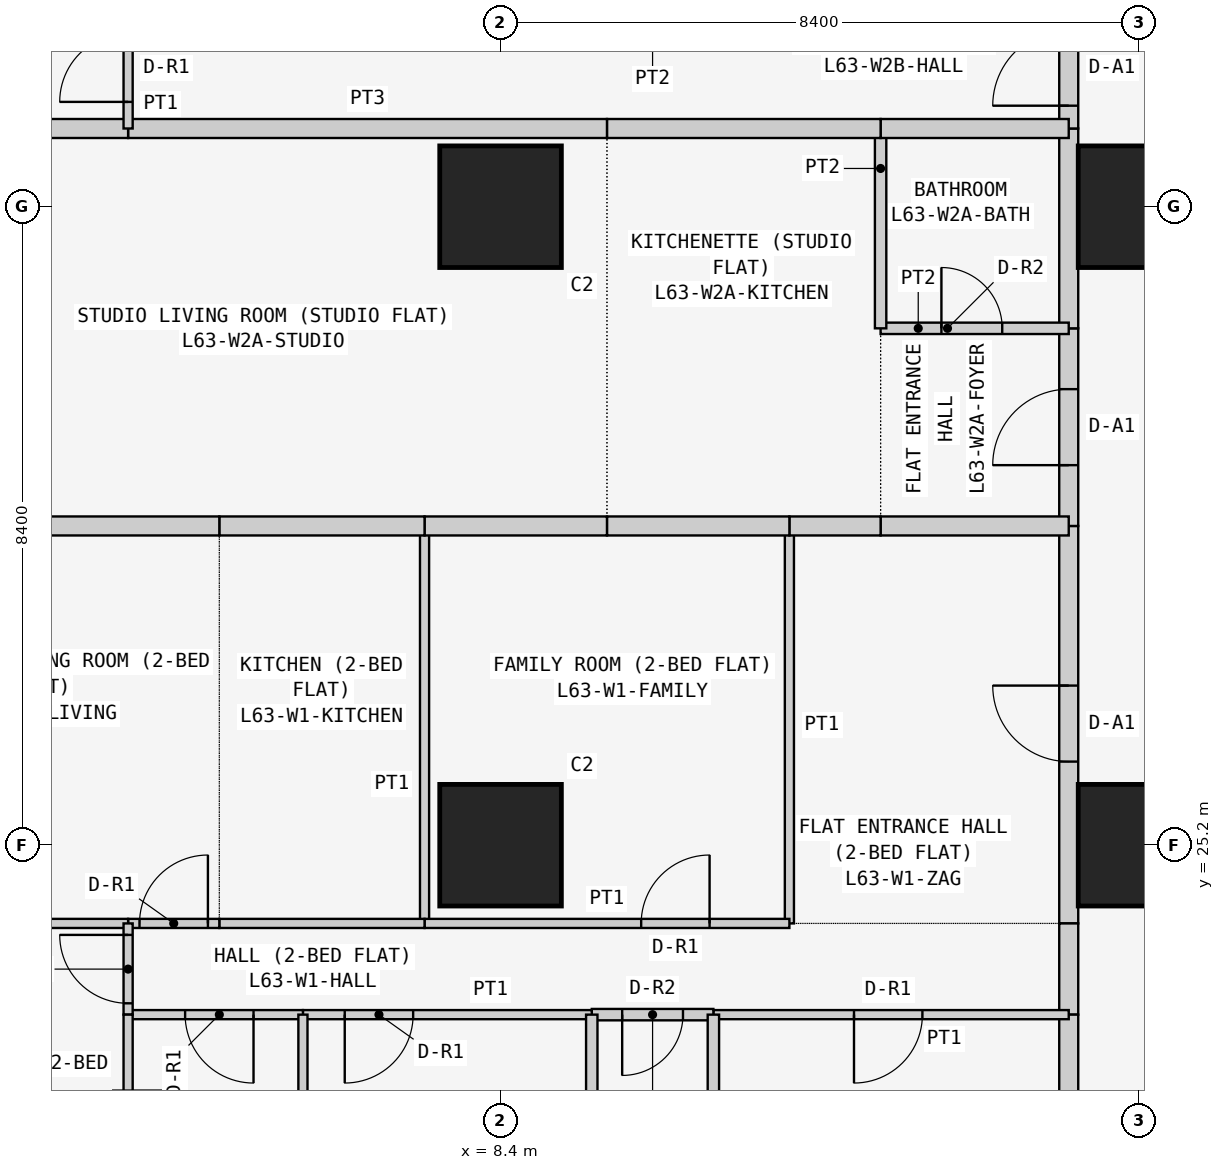
"""IFC4 building model, lengths in metres.
Left out: names, types, materials, properties, quantities, classifications, styles, units other than length and angle.
Written with IfcOpenShell. Run it as: python <this file> out.ifc"""

import sys

from ifc_helpers import new_model, si_unit, direction, frame, frame_2d, origin, origin_2d, place, context, subcontext, project, spatial, rectangle, extrude, element, fill, save


model = new_model("IFC4")
c1 = context("Model", 3, precision=1e-05, world=origin(), true_north=direction((0.0, 1.0)))
c2 = subcontext(c1, "Body", "Model", "MODEL_VIEW")
j1 = project(units=[si_unit("LENGTHUNIT", "METRE"), si_unit("PLANEANGLEUNIT", "RADIAN")], contexts=[c1])
p1 = place(None, origin())
s1 = spatial("IfcSite", under=j1, at=p1, CompositionType="ELEMENT")
p2 = place(p1, origin())
s2 = spatial("IfcBuilding", under=s1, at=p2, CompositionType="ELEMENT")
p3 = place(p2, frame((0.0, 0.0, 240.9)))
s3 = spatial("IfcBuildingStorey", under=s2, at=p3, CompositionType="ELEMENT", Elevation=240.9)
for number, where, z_axis, x_axis in (
    (1, (8.4, 25.2, 0.0), (0.0, 0.0, 1.0), (1.0, 0.0, 0.0)),
    (2, (8.4, 33.6, 0.0), (0.0, 0.0, 1.0), (1.0, 0.0, 0.0)),
    (3, (16.8, 25.2, 0.0), (0.0, 0.0, 1.0), (1.0, 0.0, 0.0)),
    (4, (16.8, 33.6, 0.0), (0.0, 0.0, 1.0), (1.0, 0.0, 0.0)),
):
    element("IfcColumn", number, at=place(p3, frame(where, z_axis=z_axis, x_axis=x_axis)), inside=s3, PredefinedType="COLUMN", context=c2, shape_type="SweptSolid", body=[
        extrude(rectangle(XDim=1.6, YDim=1.6, at=origin_2d()), origin(), (0.0, 0.0, 1.0), 3.6),
    ])
p4 = place(p3, frame((15.875, 24.171, 0.0), z_axis=(0.0, 0.0, 1.0), x_axis=(0.0, 1.0, 0.0)))
e5 = element("IfcWall", 5, at=p4, inside=s3, PredefinedType="PARTITIONING", context=c2, shape_type="SweptSolid", body=[
    extrude(rectangle(XDim=5.229, YDim=0.25, at=frame_2d((2.615, 0.0))), origin(), (0.0, 0.0, 1.0), 3.45),
])
p5 = place(p4, frame((2.129, 0.0, 0.0)))
e6 = element("IfcOpeningElement", 6, at=p5, cuts=e5, PredefinedType="OPENING", context=c2, shape_type="SweptSolid", body=[
    extrude(rectangle(XDim=1.0, YDim=2.1, at=frame_2d((0.5, 1.05))), frame((0.0, 0.135, 0.0), z_axis=(0.0, -1.0, 0.0), x_axis=(1.0, 0.0, 0.0)), (0.0, 0.0, 1.0), 0.27),
])
p6 = place(p3, frame((15.875, 22.971, 0.0), z_axis=(0.0, 0.0, 1.0), x_axis=(0.0, 1.0, 0.0)))
e7 = element("IfcWall", 7, at=p6, inside=s3, PredefinedType="PARTITIONING", context=c2, shape_type="SweptSolid", body=[
    extrude(rectangle(XDim=1.2, YDim=0.25, at=frame_2d((0.6, 0.0))), origin(), (0.0, 0.0, 1.0), 3.45),
])
p7 = place(p3, frame((15.875, 16.1, 0.0), z_axis=(0.0, 0.0, 1.0), x_axis=(0.0, 1.0, 0.0)))
e8 = element("IfcWall", 8, at=p7, inside=s3, PredefinedType="PARTITIONING", context=c2, shape_type="SweptSolid", body=[
    extrude(rectangle(XDim=6.871, YDim=0.25, at=frame_2d((3.436, 0.0))), origin(), (0.0, 0.0, 1.0), 3.45),
])
p8 = place(p3, frame((15.875, 29.4, 0.0), z_axis=(0.0, 0.0, 1.0), x_axis=(0.0, 1.0, 0.0)))
e9 = element("IfcWall", 9, at=p8, inside=s3, PredefinedType="PARTITIONING", context=c2, shape_type="SweptSolid", body=[
    extrude(rectangle(XDim=2.6, YDim=0.25, at=frame_2d((1.3, 0.0))), origin(), (0.0, 0.0, 1.0), 3.45),
])
p9 = place(p8, frame((0.8, 0.0, 0.0)))
e10 = element("IfcOpeningElement", 10, at=p9, cuts=e9, PredefinedType="OPENING", context=c2, shape_type="SweptSolid", body=[
    extrude(rectangle(XDim=1.0, YDim=2.1, at=frame_2d((0.5, 1.05))), frame((0.0, 0.135, 0.0), z_axis=(0.0, -1.0, 0.0), x_axis=(1.0, 0.0, 0.0)), (0.0, 0.0, 1.0), 0.27),
])
p10 = place(p3, frame((15.875, 32.0, 0.0), z_axis=(0.0, 0.0, 1.0), x_axis=(0.0, 1.0, 0.0)))
e11 = element("IfcWall", 11, at=p10, inside=s3, PredefinedType="PARTITIONING", context=c2, shape_type="SweptSolid", body=[
    extrude(rectangle(XDim=2.629, YDim=0.25, at=frame_2d((1.314, 0.0))), origin(), (0.0, 0.0, 1.0), 3.45),
])
p11 = place(p3, frame((15.875, 34.629, 0.0), z_axis=(0.0, 0.0, 1.0), x_axis=(0.0, 1.0, 0.0)))
e12 = element("IfcWall", 12, at=p11, inside=s3, PredefinedType="PARTITIONING", context=c2, shape_type="SweptSolid", body=[
    extrude(rectangle(XDim=1.6, YDim=0.25, at=frame_2d((0.8, 0.0))), origin(), (0.0, 0.0, 1.0), 3.45),
])
p12 = place(p11, frame((0.3, 0.0, 0.0)))
e13 = element("IfcOpeningElement", 13, at=p12, cuts=e12, PredefinedType="OPENING", context=c2, shape_type="SweptSolid", body=[
    extrude(rectangle(XDim=1.0, YDim=2.1, at=frame_2d((0.5, 1.05))), frame((0.0, 0.135, 0.0), z_axis=(0.0, -1.0, 0.0), x_axis=(1.0, 0.0, 0.0)), (0.0, 0.0, 1.0), 0.27),
])
p13 = place(p3, frame((12.2, 29.4, 0.0), z_axis=(0.0, 0.0, 1.0), x_axis=(0.0, -1.0, 0.0)))
e14 = element("IfcWall", 14, at=p13, inside=s3, PredefinedType="PARTITIONING", context=c2, shape_type="SweptSolid", body=[
    extrude(rectangle(XDim=5.229, YDim=0.12, at=frame_2d((2.615, 0.0))), origin(), (0.0, 0.0, 1.0), 3.45),
])
p14 = place(p3, frame((15.875, 29.4, 0.0), z_axis=(0.0, 0.0, 1.0), x_axis=(-1.0, 0.0, 0.0)))
e15 = element("IfcWall", 15, at=p14, inside=s3, PredefinedType="PARTITIONING", context=c2, shape_type="SweptSolid", body=[
    extrude(rectangle(XDim=2.475, YDim=0.25, at=frame_2d((1.238, 0.0))), origin(), (0.0, 0.0, 1.0), 3.45),
])
p15 = place(p3, frame((13.4, 29.4, 0.0), z_axis=(0.0, 0.0, 1.0), x_axis=(-1.0, 0.0, 0.0)))
e16 = element("IfcWall", 16, at=p15, inside=s3, PredefinedType="PARTITIONING", context=c2, shape_type="SweptSolid", body=[
    extrude(rectangle(XDim=1.2, YDim=0.25, at=frame_2d((0.6, 0.0))), origin(), (0.0, 0.0, 1.0), 3.45),
])
p16 = place(p3, frame((7.4, 29.4, 0.0), z_axis=(0.0, 0.0, 1.0), x_axis=(0.0, -1.0, 0.0)))
e17 = element("IfcWall", 17, at=p16, inside=s3, PredefinedType="PARTITIONING", context=c2, shape_type="SweptSolid", body=[
    extrude(rectangle(XDim=5.229, YDim=0.12, at=frame_2d((2.615, 0.0))), origin(), (0.0, 0.0, 1.0), 3.45),
])
p17 = place(p3, frame((7.4, 24.171, 0.0), z_axis=(0.0, 0.0, 1.0), x_axis=(1.0, 0.0, 0.0)))
e18 = element("IfcWall", 18, at=p17, inside=s3, PredefinedType="PARTITIONING", context=c2, shape_type="SweptSolid", body=[
    extrude(rectangle(XDim=4.8, YDim=0.12, at=frame_2d((2.4, 0.0))), origin(), (0.0, 0.0, 1.0), 3.45),
])
p18 = place(p17, frame((2.85, 0.0, 0.0)))
e19 = element("IfcOpeningElement", 19, at=p18, cuts=e18, PredefinedType="OPENING", context=c2, shape_type="SweptSolid", body=[
    extrude(rectangle(XDim=0.9, YDim=2.1, at=frame_2d((0.45, 1.05))), frame((0.0, 0.07, 0.0), z_axis=(0.0, -1.0, 0.0), x_axis=(1.0, 0.0, 0.0)), (0.0, 0.0, 1.0), 0.14),
])
p19 = place(p3, frame((12.2, 29.4, 0.0), z_axis=(0.0, 0.0, 1.0), x_axis=(-1.0, 0.0, 0.0)))
e20 = element("IfcWall", 20, at=p19, inside=s3, PredefinedType="PARTITIONING", context=c2, shape_type="SweptSolid", body=[
    extrude(rectangle(XDim=2.4, YDim=0.25, at=frame_2d((1.2, 0.0))), origin(), (0.0, 0.0, 1.0), 3.45),
])
p20 = place(p3, frame((9.8, 29.4, 0.0), z_axis=(0.0, 0.0, 1.0), x_axis=(-1.0, 0.0, 0.0)))
e21 = element("IfcWall", 21, at=p20, inside=s3, PredefinedType="PARTITIONING", context=c2, shape_type="SweptSolid", body=[
    extrude(rectangle(XDim=2.4, YDim=0.25, at=frame_2d((1.2, 0.0))), origin(), (0.0, 0.0, 1.0), 3.45),
])
p21 = place(p3, frame((4.7, 24.171, 0.0), z_axis=(0.0, 0.0, 1.0), x_axis=(1.0, 0.0, 0.0)))
e22 = element("IfcWall", 22, at=p21, inside=s3, PredefinedType="PARTITIONING", context=c2, shape_type="SweptSolid", body=[
    extrude(rectangle(XDim=2.7, YDim=0.12, at=frame_2d((1.35, 0.0))), origin(), (0.0, 0.0, 1.0), 3.45),
])
p22 = place(p3, frame((7.4, 29.4, 0.0), z_axis=(0.0, 0.0, 1.0), x_axis=(-1.0, 0.0, 0.0)))
e23 = element("IfcWall", 23, at=p22, inside=s3, PredefinedType="PARTITIONING", context=c2, shape_type="SweptSolid", body=[
    extrude(rectangle(XDim=2.7, YDim=0.25, at=frame_2d((1.35, 0.0))), origin(), (0.0, 0.0, 1.0), 3.45),
])
p23 = place(p3, frame((3.5, 24.171, 0.0), z_axis=(0.0, 0.0, 1.0), x_axis=(1.0, 0.0, 0.0)))
e24 = element("IfcWall", 24, at=p23, inside=s3, PredefinedType="PARTITIONING", context=c2, shape_type="SweptSolid", body=[
    extrude(rectangle(XDim=1.2, YDim=0.12, at=frame_2d((0.6, 0.0))), origin(), (0.0, 0.0, 1.0), 3.45),
])
p24 = place(p23, frame((0.15, 0.0, 0.0)))
e25 = element("IfcOpeningElement", 25, at=p24, cuts=e24, PredefinedType="OPENING", context=c2, shape_type="SweptSolid", body=[
    extrude(rectangle(XDim=0.9, YDim=2.1, at=frame_2d((0.45, 1.05))), frame((0.0, 0.07, 0.0), z_axis=(0.0, -1.0, 0.0), x_axis=(1.0, 0.0, 0.0)), (0.0, 0.0, 1.0), 0.14),
])
p25 = place(p3, frame((-0.65, 24.171, 0.0), z_axis=(0.0, 0.0, 1.0), x_axis=(1.0, 0.0, 0.0)))
e26 = element("IfcWall", 26, at=p25, inside=s3, PredefinedType="PARTITIONING", context=c2, shape_type="SweptSolid", body=[
    extrude(rectangle(XDim=4.15, YDim=0.12, at=frame_2d((2.075, 0.0))), origin(), (0.0, 0.0, 1.0), 3.45),
])
p26 = place(p3, frame((4.7, 29.4, 0.0), z_axis=(0.0, 0.0, 1.0), x_axis=(-1.0, 0.0, 0.0)))
e27 = element("IfcWall", 27, at=p26, inside=s3, PredefinedType="PARTITIONING", context=c2, shape_type="SweptSolid", body=[
    extrude(rectangle(XDim=5.35, YDim=0.25, at=frame_2d((2.675, 0.0))), origin(), (0.0, 0.0, 1.0), 3.45),
])
p27 = place(p3, frame((11.2, 22.971, 0.0), z_axis=(0.0, 0.0, 1.0), x_axis=(1.0, 0.0, 0.0)))
e28 = element("IfcWall", 28, at=p27, inside=s3, PredefinedType="PARTITIONING", context=c2, shape_type="SweptSolid", body=[
    extrude(rectangle(XDim=4.675, YDim=0.12, at=frame_2d((2.337, 0.0))), origin(), (0.0, 0.0, 1.0), 3.45),
])
p28 = place(p27, frame((1.85, 0.0, 0.0)))
e29 = element("IfcOpeningElement", 29, at=p28, cuts=e28, PredefinedType="OPENING", context=c2, shape_type="SweptSolid", body=[
    extrude(rectangle(XDim=0.9, YDim=2.1, at=frame_2d((0.45, 1.05))), frame((0.0, 0.07, 0.0), z_axis=(0.0, -1.0, 0.0), x_axis=(1.0, 0.0, 0.0)), (0.0, 0.0, 1.0), 0.14),
])
p29 = place(p3, frame((9.6, 22.971, 0.0), z_axis=(0.0, 0.0, 1.0), x_axis=(1.0, 0.0, 0.0)))
e30 = element("IfcWall", 30, at=p29, inside=s3, PredefinedType="PARTITIONING", context=c2, shape_type="SweptSolid", body=[
    extrude(rectangle(XDim=1.6, YDim=0.15, at=frame_2d((0.8, 0.0))), origin(), (0.0, 0.0, 1.0), 3.45),
])
p30 = place(p29, frame((0.4, 0.0, 0.0)))
e31 = element("IfcOpeningElement", 31, at=p30, cuts=e30, PredefinedType="OPENING", context=c2, shape_type="SweptSolid", body=[
    extrude(rectangle(XDim=0.8, YDim=2.1, at=frame_2d((0.4, 1.05))), frame((0.0, 0.085, 0.0), z_axis=(0.0, -1.0, 0.0), x_axis=(1.0, 0.0, 0.0)), (0.0, 0.0, 1.0), 0.17),
])
p31 = place(p3, frame((5.8, 22.971, 0.0), z_axis=(0.0, 0.0, 1.0), x_axis=(1.0, 0.0, 0.0)))
e32 = element("IfcWall", 32, at=p31, inside=s3, PredefinedType="PARTITIONING", context=c2, shape_type="SweptSolid", body=[
    extrude(rectangle(XDim=3.8, YDim=0.12, at=frame_2d((1.9, 0.0))), origin(), (0.0, 0.0, 1.0), 3.45),
])
p32 = place(p31, frame((0.55, 0.0, 0.0)))
e33 = element("IfcOpeningElement", 33, at=p32, cuts=e32, PredefinedType="OPENING", context=c2, shape_type="SweptSolid", body=[
    extrude(rectangle(XDim=0.9, YDim=2.1, at=frame_2d((0.45, 1.05))), frame((0.0, 0.07, 0.0), z_axis=(0.0, -1.0, 0.0), x_axis=(1.0, 0.0, 0.0)), (0.0, 0.0, 1.0), 0.14),
])
p33 = place(p3, frame((3.5, 22.971, 0.0), z_axis=(0.0, 0.0, 1.0), x_axis=(1.0, 0.0, 0.0)))
e34 = element("IfcWall", 34, at=p33, inside=s3, PredefinedType="PARTITIONING", context=c2, shape_type="SweptSolid", body=[
    extrude(rectangle(XDim=2.3, YDim=0.12, at=frame_2d((1.15, 0.0))), origin(), (0.0, 0.0, 1.0), 3.45),
])
p34 = place(p33, frame((0.75, 0.0, 0.0)))
e35 = element("IfcOpeningElement", 35, at=p34, cuts=e34, PredefinedType="OPENING", context=c2, shape_type="SweptSolid", body=[
    extrude(rectangle(XDim=0.9, YDim=2.1, at=frame_2d((0.45, 1.05))), frame((0.0, 0.07, 0.0), z_axis=(0.0, -1.0, 0.0), x_axis=(1.0, 0.0, 0.0)), (0.0, 0.0, 1.0), 0.14),
])
p35 = place(p3, frame((3.5, 24.171, 0.0), z_axis=(0.0, 0.0, 1.0), x_axis=(0.0, -1.0, 0.0)))
e36 = element("IfcWall", 36, at=p35, inside=s3, PredefinedType="PARTITIONING", context=c2, shape_type="SweptSolid", body=[
    extrude(rectangle(XDim=1.2, YDim=0.12, at=frame_2d((0.6, 0.0))), origin(), (0.0, 0.0, 1.0), 3.45),
])
p36 = place(p35, frame((0.151, 0.0, 0.0)))
e37 = element("IfcOpeningElement", 37, at=p36, cuts=e36, PredefinedType="OPENING", context=c2, shape_type="SweptSolid", body=[
    extrude(rectangle(XDim=0.9, YDim=2.1, at=frame_2d((0.45, 1.05))), frame((0.0, 0.07, 0.0), z_axis=(0.0, -1.0, 0.0), x_axis=(1.0, 0.0, 0.0)), (0.0, 0.0, 1.0), 0.14),
])
for number, where, z_axis, x_axis in (
    (38, (11.2, 22.971, 0.0), (0.0, 0.0, 1.0), (0.0, -1.0, 0.0)),
    (39, (9.6, 22.971, 0.0), (0.0, 0.0, 1.0), (0.0, -1.0, 0.0)),
):
    element("IfcWall", number, at=place(p3, frame(where, z_axis=z_axis, x_axis=x_axis)), inside=s3, PredefinedType="PARTITIONING", context=c2, shape_type="SweptSolid", body=[
        extrude(rectangle(XDim=6.871, YDim=0.15, at=frame_2d((3.436, 0.0))), origin(), (0.0, 0.0, 1.0), 3.45),
    ])
for number, where, z_axis, x_axis in (
    (40, (5.8, 20.971, 0.0), (0.0, 0.0, 1.0), (0.0, 1.0, 0.0)),
    (41, (3.5, 22.971, 0.0), (0.0, 0.0, 1.0), (0.0, -1.0, 0.0)),
):
    element("IfcWall", number, at=place(p3, frame(where, z_axis=z_axis, x_axis=x_axis)), inside=s3, PredefinedType="PARTITIONING", context=c2, shape_type="SweptSolid", body=[
        extrude(rectangle(XDim=2.0, YDim=0.12, at=frame_2d((1.0, 0.0))), origin(), (0.0, 0.0, 1.0), 3.45),
    ])
p37 = place(p3, frame((13.4, 32.0, 0.0), z_axis=(0.0, 0.0, 1.0), x_axis=(1.0, 0.0, 0.0)))
e42 = element("IfcWall", 42, at=p37, inside=s3, PredefinedType="PARTITIONING", context=c2, shape_type="SweptSolid", body=[
    extrude(rectangle(XDim=2.475, YDim=0.15, at=frame_2d((1.238, 0.0))), origin(), (0.0, 0.0, 1.0), 3.45),
])
p38 = place(p37, frame((0.8, 0.0, 0.0)))
e43 = element("IfcOpeningElement", 43, at=p38, cuts=e42, PredefinedType="OPENING", context=c2, shape_type="SweptSolid", body=[
    extrude(rectangle(XDim=0.8, YDim=2.1, at=frame_2d((0.4, 1.05))), frame((0.0, 0.085, 0.0), z_axis=(0.0, -1.0, 0.0), x_axis=(1.0, 0.0, 0.0)), (0.0, 0.0, 1.0), 0.17),
])
p39 = place(p3, frame((13.4, 32.0, 0.0), z_axis=(0.0, 0.0, 1.0), x_axis=(0.0, 1.0, 0.0)))
e44 = element("IfcWall", 44, at=p39, inside=s3, PredefinedType="PARTITIONING", context=c2, shape_type="SweptSolid", body=[
    extrude(rectangle(XDim=2.629, YDim=0.15, at=frame_2d((1.314, 0.0))), origin(), (0.0, 0.0, 1.0), 3.45),
])
p40 = place(p3, frame((13.4, 34.629, 0.0), z_axis=(0.0, 0.0, 1.0), x_axis=(1.0, 0.0, 0.0)))
e45 = element("IfcWall", 45, at=p40, inside=s3, PredefinedType="PARTITIONING", context=c2, shape_type="SweptSolid", body=[
    extrude(rectangle(XDim=2.475, YDim=0.25, at=frame_2d((1.238, 0.0))), origin(), (0.0, 0.0, 1.0), 3.45),
])
p41 = place(p3, frame((9.8, 34.629, 0.0), z_axis=(0.0, 0.0, 1.0), x_axis=(1.0, 0.0, 0.0)))
e46 = element("IfcWall", 46, at=p41, inside=s3, PredefinedType="PARTITIONING", context=c2, shape_type="SweptSolid", body=[
    extrude(rectangle(XDim=3.6, YDim=0.25, at=frame_2d((1.8, 0.0))), origin(), (0.0, 0.0, 1.0), 3.45),
])
p42 = place(p3, frame((3.5, 34.629, 0.0), z_axis=(0.0, 0.0, 1.0), x_axis=(1.0, 0.0, 0.0)))
e47 = element("IfcWall", 47, at=p42, inside=s3, PredefinedType="PARTITIONING", context=c2, shape_type="SweptSolid", body=[
    extrude(rectangle(XDim=6.3, YDim=0.25, at=frame_2d((3.15, 0.0))), origin(), (0.0, 0.0, 1.0), 3.45),
])
p43 = place(p3, frame((-0.65, 34.629, 0.0), z_axis=(0.0, 0.0, 1.0), x_axis=(1.0, 0.0, 0.0)))
e48 = element("IfcWall", 48, at=p43, inside=s3, PredefinedType="PARTITIONING", context=c2, shape_type="SweptSolid", body=[
    extrude(rectangle(XDim=4.15, YDim=0.25, at=frame_2d((2.075, 0.0))), origin(), (0.0, 0.0, 1.0), 3.45),
])
p44 = place(p3, frame((3.5, 34.629, 0.0), z_axis=(0.0, 0.0, 1.0), x_axis=(0.0, 1.0, 0.0)))
e49 = element("IfcWall", 49, at=p44, inside=s3, PredefinedType="PARTITIONING", context=c2, shape_type="SweptSolid", body=[
    extrude(rectangle(XDim=1.6, YDim=0.12, at=frame_2d((0.8, 0.0))), origin(), (0.0, 0.0, 1.0), 3.45),
])
p45 = place(p44, frame((0.35, 0.0, 0.0)))
e50 = element("IfcOpeningElement", 50, at=p45, cuts=e49, PredefinedType="OPENING", context=c2, shape_type="SweptSolid", body=[
    extrude(rectangle(XDim=0.9, YDim=2.1, at=frame_2d((0.45, 1.05))), frame((0.0, 0.07, 0.0), z_axis=(0.0, -1.0, 0.0), x_axis=(1.0, 0.0, 0.0)), (0.0, 0.0, 1.0), 0.14),
])
p46 = place(p5, origin())
e51 = element("IfcDoor", 51, at=p46, inside=s3, OperationType="SINGLE_SWING_RIGHT", PredefinedType="DOOR", context=c2, shape_type="SweptSolid", body=[
    extrude(rectangle(XDim=1.0, YDim=2.1, at=frame_2d((0.5, 1.05))), frame((0.0, 0.025, 0.0), z_axis=(0.0, -1.0, 0.0), x_axis=(1.0, 0.0, 0.0)), (0.0, 0.0, 1.0), 0.05),
])
fill(e6, e51)
p47 = place(p18, origin())
e52 = element("IfcDoor", 52, at=p47, inside=s3, OperationType="SINGLE_SWING_RIGHT", PredefinedType="DOOR", context=c2, shape_type="SweptSolid", body=[
    extrude(rectangle(XDim=0.9, YDim=2.1, at=frame_2d((0.45, 1.05))), frame((0.0, 0.025, 0.0), z_axis=(0.0, -1.0, 0.0), x_axis=(1.0, 0.0, 0.0)), (0.0, 0.0, 1.0), 0.05),
])
fill(e19, e52)
p48 = place(p24, origin())
e53 = element("IfcDoor", 53, at=p48, inside=s3, OperationType="SINGLE_SWING_RIGHT", PredefinedType="DOOR", context=c2, shape_type="SweptSolid", body=[
    extrude(rectangle(XDim=0.9, YDim=2.1, at=frame_2d((0.45, 1.05))), frame((0.0, 0.025, 0.0), z_axis=(0.0, -1.0, 0.0), x_axis=(1.0, 0.0, 0.0)), (0.0, 0.0, 1.0), 0.05),
])
fill(e25, e53)
p49 = place(p28, frame((0.9, 0.0, 0.0), z_axis=(0.0, 0.0, 1.0), x_axis=(-1.0, 0.0, 0.0)))
e54 = element("IfcDoor", 54, at=p49, inside=s3, OperationType="SINGLE_SWING_RIGHT", PredefinedType="DOOR", context=c2, shape_type="SweptSolid", body=[
    extrude(rectangle(XDim=0.9, YDim=2.1, at=frame_2d((0.45, 1.05))), frame((0.0, 0.025, 0.0), z_axis=(0.0, -1.0, 0.0), x_axis=(1.0, 0.0, 0.0)), (0.0, 0.0, 1.0), 0.05),
])
fill(e29, e54)
p50 = place(p30, frame((0.8, 0.0, 0.0), z_axis=(0.0, 0.0, 1.0), x_axis=(-1.0, 0.0, 0.0)))
e55 = element("IfcDoor", 55, at=p50, inside=s3, OperationType="SINGLE_SWING_RIGHT", PredefinedType="DOOR", context=c2, shape_type="SweptSolid", body=[
    extrude(rectangle(XDim=0.8, YDim=2.1, at=frame_2d((0.4, 1.05))), frame((0.0, 0.025, 0.0), z_axis=(0.0, -1.0, 0.0), x_axis=(1.0, 0.0, 0.0)), (0.0, 0.0, 1.0), 0.05),
])
fill(e31, e55)
p51 = place(p32, frame((0.9, 0.0, 0.0), z_axis=(0.0, 0.0, 1.0), x_axis=(-1.0, 0.0, 0.0)))
e56 = element("IfcDoor", 56, at=p51, inside=s3, OperationType="SINGLE_SWING_RIGHT", PredefinedType="DOOR", context=c2, shape_type="SweptSolid", body=[
    extrude(rectangle(XDim=0.9, YDim=2.1, at=frame_2d((0.45, 1.05))), frame((0.0, 0.025, 0.0), z_axis=(0.0, -1.0, 0.0), x_axis=(1.0, 0.0, 0.0)), (0.0, 0.0, 1.0), 0.05),
])
fill(e33, e56)
p52 = place(p34, frame((0.9, 0.0, 0.0), z_axis=(0.0, 0.0, 1.0), x_axis=(-1.0, 0.0, 0.0)))
e57 = element("IfcDoor", 57, at=p52, inside=s3, OperationType="SINGLE_SWING_LEFT", PredefinedType="DOOR", context=c2, shape_type="SweptSolid", body=[
    extrude(rectangle(XDim=0.9, YDim=2.1, at=frame_2d((0.45, 1.05))), frame((0.0, 0.025, 0.0), z_axis=(0.0, -1.0, 0.0), x_axis=(1.0, 0.0, 0.0)), (0.0, 0.0, 1.0), 0.05),
])
fill(e35, e57)
p53 = place(p36, frame((0.9, 0.0, 0.0), z_axis=(0.0, 0.0, 1.0), x_axis=(-1.0, 0.0, 0.0)))
e58 = element("IfcDoor", 58, at=p53, inside=s3, OperationType="SINGLE_SWING_RIGHT", PredefinedType="DOOR", context=c2, shape_type="SweptSolid", body=[
    extrude(rectangle(XDim=0.9, YDim=2.1, at=frame_2d((0.45, 1.05))), frame((0.0, 0.025, 0.0), z_axis=(0.0, -1.0, 0.0), x_axis=(1.0, 0.0, 0.0)), (0.0, 0.0, 1.0), 0.05),
])
fill(e37, e58)
p54 = place(p9, origin())
e59 = element("IfcDoor", 59, at=p54, inside=s3, OperationType="SINGLE_SWING_LEFT", PredefinedType="DOOR", context=c2, shape_type="SweptSolid", body=[
    extrude(rectangle(XDim=1.0, YDim=2.1, at=frame_2d((0.5, 1.05))), frame((0.0, 0.025, 0.0), z_axis=(0.0, -1.0, 0.0), x_axis=(1.0, 0.0, 0.0)), (0.0, 0.0, 1.0), 0.05),
])
fill(e10, e59)
p55 = place(p38, origin())
e60 = element("IfcDoor", 60, at=p55, inside=s3, OperationType="SINGLE_SWING_LEFT", PredefinedType="DOOR", context=c2, shape_type="SweptSolid", body=[
    extrude(rectangle(XDim=0.8, YDim=2.1, at=frame_2d((0.4, 1.05))), frame((0.0, 0.025, 0.0), z_axis=(0.0, -1.0, 0.0), x_axis=(1.0, 0.0, 0.0)), (0.0, 0.0, 1.0), 0.05),
])
fill(e43, e60)
p56 = place(p12, origin())
e61 = element("IfcDoor", 61, at=p56, inside=s3, OperationType="SINGLE_SWING_LEFT", PredefinedType="DOOR", context=c2, shape_type="SweptSolid", body=[
    extrude(rectangle(XDim=1.0, YDim=2.1, at=frame_2d((0.5, 1.05))), frame((0.0, 0.025, 0.0), z_axis=(0.0, -1.0, 0.0), x_axis=(1.0, 0.0, 0.0)), (0.0, 0.0, 1.0), 0.05),
])
fill(e13, e61)
p57 = place(p45, origin())
e62 = element("IfcDoor", 62, at=p57, inside=s3, OperationType="SINGLE_SWING_LEFT", PredefinedType="DOOR", context=c2, shape_type="SweptSolid", body=[
    extrude(rectangle(XDim=0.9, YDim=2.1, at=frame_2d((0.45, 1.05))), frame((0.0, 0.025, 0.0), z_axis=(0.0, -1.0, 0.0), x_axis=(1.0, 0.0, 0.0)), (0.0, 0.0, 1.0), 0.05),
])
fill(e50, e62)
save(model, sys.argv[1])
